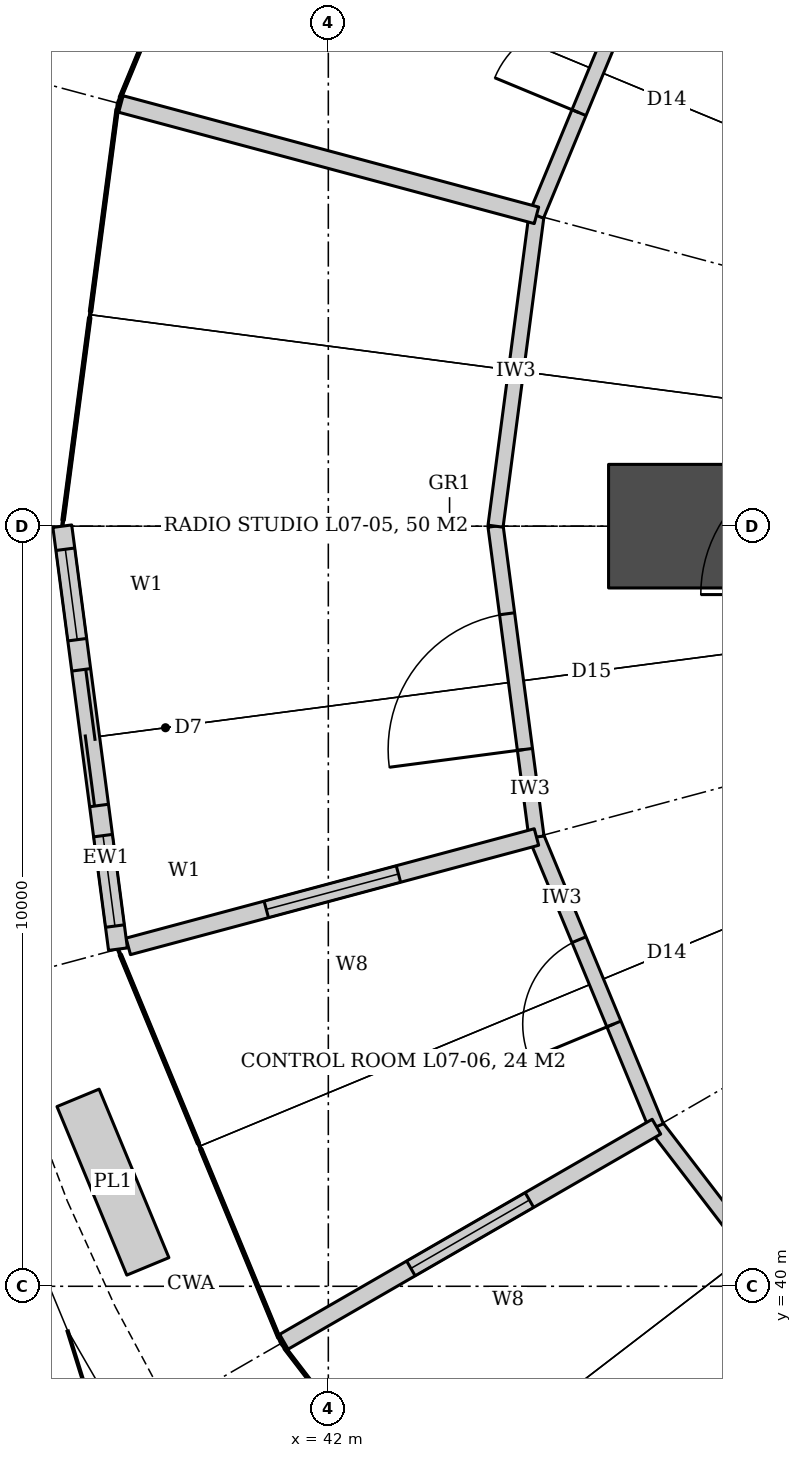
"""IFC4 building model, lengths in metres.
Left out: names, types, materials, properties, quantities, classifications, styles, units other than length and angle.
Written with IfcOpenShell. Run it as: python <this file> out.ifc"""

import sys

from ifc_helpers import new_model, si_unit, direction, frame, frame_2d, origin, origin_2d, place, context, subcontext, project, spatial, rectangle, hollow_circle, extrude, element, fill, save


model = new_model("IFC4")
c1 = context("Model", 3, precision=1e-05, world=origin(), true_north=direction((0.0, 1.0)))
c2 = subcontext(c1, "Body", "Model", "MODEL_VIEW")
j1 = project(units=[si_unit("LENGTHUNIT", "METRE"), si_unit("PLANEANGLEUNIT", "RADIAN")], contexts=[c1])
p1 = place(None, origin())
s1 = spatial("IfcSite", under=j1, at=p1, CompositionType="ELEMENT")
p2 = place(p1, origin())
s2 = spatial("IfcBuilding", under=s1, at=p2, CompositionType="ELEMENT")
p3 = place(p2, frame((0.0, 0.0, 30.2)))
s3 = spatial("IfcBuildingStorey", under=s2, at=p3, CompositionType="ELEMENT", Elevation=30.2)
p4 = place(p3, frame((46.5, 50.0, 0.0), z_axis=(0.0, 0.0, 1.0), x_axis=(1.0, 0.0, 0.0)))
e1 = element("IfcColumn", 1, at=p4, inside=s3, PredefinedType="COLUMN", context=c2, shape_type="SweptSolid", body=[
    extrude(hollow_circle(Radius=0.813, WallThickness=0.08, at=origin_2d()), origin(), (0.0, 0.0, 1.0), 4.2),
])
p5 = place(p3, frame((48.828, 38.828, 0.0), z_axis=(0.0, 0.0, 1.0), x_axis=(-0.608714823874, 0.793389099494, 0.0)))
e2 = element("IfcWall", 2, at=p5, inside=s3, PredefinedType="PARTITIONING", context=c2, shape_type="SweptSolid", body=[
    extrude(rectangle(XDim=4.125, YDim=0.2, at=frame_2d((2.062, 0.0))), origin(), (0.0, 0.0, 1.0), 3.04),
])
p6 = place(p3, frame((46.317, 42.1, 0.0), z_axis=(0.0, 0.0, 1.0), x_axis=(-0.382731667114, 0.923859551549, 0.0)))
e3 = element("IfcWall", 3, at=p6, inside=s3, PredefinedType="PARTITIONING", context=c2, shape_type="SweptSolid", body=[
    extrude(rectangle(XDim=4.125, YDim=0.2, at=frame_2d((2.062, 0.0))), origin(), (0.0, 0.0, 1.0), 3.04),
])
p7 = place(p6, frame((1.462, 0.0, 0.0)))
e4 = element("IfcOpeningElement", 4, at=p7, cuts=e3, PredefinedType="OPENING", context=c2, shape_type="SweptSolid", body=[
    extrude(rectangle(XDim=1.2, YDim=2.4, at=frame_2d((0.6, 1.2))), frame((0.0, 0.11, 0.0), z_axis=(0.0, -1.0, 0.0), x_axis=(1.0, 0.0, 0.0)), (0.0, 0.0, 1.0), 0.22),
])
p8 = place(p3, frame((44.738, 45.911, 0.0), z_axis=(0.0, 0.0, 1.0), x_axis=(-0.130515758099, 0.991446234996, 0.0)))
e5 = element("IfcWall", 5, at=p8, inside=s3, PredefinedType="PARTITIONING", context=c2, shape_type="SweptSolid", body=[
    extrude(rectangle(XDim=4.125, YDim=0.2, at=frame_2d((2.062, 0.0))), origin(), (0.0, 0.0, 1.0), 3.04),
])
p9 = place(p8, frame((1.162, 0.0, 0.0)))
e6 = element("IfcOpeningElement", 6, at=p9, cuts=e5, PredefinedType="OPENING", context=c2, shape_type="SweptSolid", body=[
    extrude(rectangle(XDim=1.8, YDim=2.7, at=frame_2d((0.9, 1.35))), frame((0.0, 0.11, 0.0), z_axis=(0.0, -1.0, 0.0), x_axis=(1.0, 0.0, 0.0)), (0.0, 0.0, 1.0), 0.22),
])
p10 = place(p3, frame((44.2, 50.0, 0.0), z_axis=(0.0, 0.0, 1.0), x_axis=(0.130515758099, 0.991446234996, 0.0)))
e7 = element("IfcWall", 7, at=p10, inside=s3, PredefinedType="PARTITIONING", context=c2, shape_type="SweptSolid", body=[
    extrude(rectangle(XDim=4.125, YDim=0.2, at=frame_2d((2.062, 0.0))), origin(), (0.0, 0.0, 1.0), 3.04),
])
p11 = place(p3, frame((44.738, 54.089, 0.0), z_axis=(0.0, 0.0, 1.0), x_axis=(0.382731667114, 0.923859551549, 0.0)))
e8 = element("IfcWall", 8, at=p11, inside=s3, PredefinedType="PARTITIONING", context=c2, shape_type="SweptSolid", body=[
    extrude(rectangle(XDim=4.125, YDim=0.2, at=frame_2d((2.062, 0.0))), origin(), (0.0, 0.0, 1.0), 3.04),
])
p12 = place(p11, frame((1.462, 0.0, 0.0)))
e9 = element("IfcOpeningElement", 9, at=p12, cuts=e8, PredefinedType="OPENING", context=c2, shape_type="SweptSolid", body=[
    extrude(rectangle(XDim=1.2, YDim=2.4, at=frame_2d((0.6, 1.2))), frame((0.0, 0.11, 0.0), z_axis=(0.0, -1.0, 0.0), x_axis=(1.0, 0.0, 0.0)), (0.0, 0.0, 1.0), 0.22),
])
p13 = place(p3, frame((44.738, 54.089, 0.0), z_axis=(0.0, 0.0, 1.0), x_axis=(-0.965926729572, 0.258815673981, 0.0)))
e10 = element("IfcWall", 10, at=p13, inside=s3, PredefinedType="PARTITIONING", context=c2, shape_type="SweptSolid", body=[
    extrude(rectangle(XDim=5.06, YDim=0.225, at=frame_2d((2.53, 0.0))), origin(), (0.0, 0.0, 1.0), 3.04),
])
p14 = place(p3, frame((44.738, 45.911, 0.0), z_axis=(0.0, 0.0, 1.0), x_axis=(-0.965925420227, -0.258820560544, 0.0)))
e11 = element("IfcWall", 11, at=p14, inside=s3, PredefinedType="PARTITIONING", context=c2, shape_type="SweptSolid", body=[
    extrude(rectangle(XDim=4.96, YDim=0.225, at=frame_2d((2.48, 0.0))), origin(), (0.0, 0.0, 1.0), 3.04),
])
p15 = place(p14, frame((1.58, 0.0, 0.9)))
e12 = element("IfcOpeningElement", 12, at=p15, cuts=e11, PredefinedType="OPENING", context=c2, shape_type="SweptSolid", body=[
    extrude(rectangle(XDim=1.8, YDim=1.2, at=frame_2d((0.9, 0.6))), frame((0.0, 0.123, 0.0), z_axis=(0.0, -1.0, 0.0), x_axis=(1.0, 0.0, 0.0)), (0.0, 0.0, 1.0), 0.245),
])
p16 = place(p3, frame((46.317, 42.1, 0.0), z_axis=(0.0, 0.0, 1.0), x_axis=(-0.866022478443, -0.500005066806, 0.0)))
e13 = element("IfcWall", 13, at=p16, inside=s3, PredefinedType="PARTITIONING", context=c2, shape_type="SweptSolid", body=[
    extrude(rectangle(XDim=5.06, YDim=0.225, at=frame_2d((2.53, 0.0))), origin(), (0.0, 0.0, 1.0), 3.04),
])
p17 = place(p16, frame((1.63, 0.0, 0.9)))
e14 = element("IfcOpeningElement", 14, at=p17, cuts=e13, PredefinedType="OPENING", context=c2, shape_type="SweptSolid", body=[
    extrude(rectangle(XDim=1.8, YDim=1.2, at=frame_2d((0.9, 0.6))), frame((0.0, 0.123, 0.0), z_axis=(0.0, -1.0, 0.0), x_axis=(1.0, 0.0, 0.0)), (0.0, 0.0, 1.0), 0.245),
])
p18 = place(p3, frame((39.1, 50.0, 0.0), z_axis=(0.0, 0.0, 1.0), x_axis=(0.130525119492, -0.991445002601, 0.0)))
e15 = element("IfcWall", 15, at=p18, inside=s3, PredefinedType="SOLIDWALL", context=c2, shape_type="SweptSolid", body=[
    extrude(rectangle(XDim=5.456, YDim=0.25, at=frame_2d((2.728, 0.0))), origin(), (0.0, 0.0, 1.0), 4.04),
])
p19 = place(p18, frame((1.828, 0.0, 0.0)))
e16 = element("IfcOpeningElement", 16, at=p19, cuts=e15, PredefinedType="OPENING", context=c2, shape_type="SweptSolid", body=[
    extrude(rectangle(XDim=1.8, YDim=2.4, at=frame_2d((0.9, 1.2))), frame((0.0, 0.135, 0.0), z_axis=(0.0, -1.0, 0.0), x_axis=(1.0, 0.0, 0.0)), (0.0, 0.0, 1.0), 0.27),
])
p20 = place(p18, frame((0.228, 0.0, 0.0)))
e17 = element("IfcOpeningElement", 17, at=p20, cuts=e15, PredefinedType="OPENING", context=c2, shape_type="SweptSolid", body=[
    extrude(rectangle(XDim=1.2, YDim=2.4, at=frame_2d((0.6, 1.2))), frame((0.0, 0.135, 0.0), z_axis=(0.0, -1.0, 0.0), x_axis=(1.0, 0.0, 0.0)), (0.0, 0.0, 1.0), 0.27),
])
p21 = place(p18, frame((4.028, 0.0, 0.0)))
e18 = element("IfcOpeningElement", 18, at=p21, cuts=e15, PredefinedType="OPENING", context=c2, shape_type="SweptSolid", body=[
    extrude(rectangle(XDim=1.2, YDim=2.4, at=frame_2d((0.6, 1.2))), frame((0.0, 0.135, 0.0), z_axis=(0.0, -1.0, 0.0), x_axis=(1.0, 0.0, 0.0)), (0.0, 0.0, 1.0), 0.27),
])
p22 = place(p15, origin())
e19 = element("IfcWindow", 19, at=p22, inside=s3, PartitioningType="SINGLE_PANEL", PredefinedType="WINDOW", context=c2, shape_type="SweptSolid", body=[
    extrude(rectangle(XDim=1.8, YDim=1.2, at=frame_2d((0.9, 0.6))), frame((0.0, 0.03, 0.0), z_axis=(0.0, -1.0, 0.0), x_axis=(1.0, 0.0, 0.0)), (0.0, 0.0, 1.0), 0.06),
])
fill(e12, e19)
p23 = place(p17, origin())
e20 = element("IfcWindow", 20, at=p23, inside=s3, PartitioningType="SINGLE_PANEL", PredefinedType="WINDOW", context=c2, shape_type="SweptSolid", body=[
    extrude(rectangle(XDim=1.8, YDim=1.2, at=frame_2d((0.9, 0.6))), frame((0.0, 0.03, 0.0), z_axis=(0.0, -1.0, 0.0), x_axis=(1.0, 0.0, 0.0)), (0.0, 0.0, 1.0), 0.06),
])
fill(e14, e20)
p24 = place(p12, origin())
e21 = element("IfcDoor", 21, at=p24, inside=s3, OperationType="SINGLE_SWING_LEFT", PredefinedType="DOOR", context=c2, shape_type="SweptSolid", body=[
    extrude(rectangle(XDim=1.2, YDim=2.4, at=frame_2d((0.6, 1.2))), frame((0.0, 0.025, 0.0), z_axis=(0.0, -1.0, 0.0), x_axis=(1.0, 0.0, 0.0)), (0.0, 0.0, 1.0), 0.05),
])
fill(e9, e21)
p25 = place(p9, origin())
e22 = element("IfcDoor", 22, at=p25, inside=s3, OperationType="DOUBLE_DOOR_DOUBLE_SWING", PredefinedType="DOOR", context=c2, shape_type="SweptSolid", body=[
    extrude(rectangle(XDim=1.8, YDim=2.7, at=frame_2d((0.9, 1.35))), frame((0.0, 0.025, 0.0), z_axis=(0.0, -1.0, 0.0), x_axis=(1.0, 0.0, 0.0)), (0.0, 0.0, 1.0), 0.05),
])
fill(e6, e22)
p26 = place(p7, origin())
e23 = element("IfcDoor", 23, at=p26, inside=s3, OperationType="SINGLE_SWING_LEFT", PredefinedType="DOOR", context=c2, shape_type="SweptSolid", body=[
    extrude(rectangle(XDim=1.2, YDim=2.4, at=frame_2d((0.6, 1.2))), frame((0.0, 0.025, 0.0), z_axis=(0.0, -1.0, 0.0), x_axis=(1.0, 0.0, 0.0)), (0.0, 0.0, 1.0), 0.05),
])
fill(e4, e23)
p27 = place(p19, origin())
e24 = element("IfcDoor", 24, at=p27, inside=s3, OperationType="DOUBLE_DOOR_SLIDING", PredefinedType="DOOR", context=c2, shape_type="SweptSolid", body=[
    extrude(rectangle(XDim=1.8, YDim=2.4, at=frame_2d((0.9, 1.2))), frame((0.0, 0.025, 0.0), z_axis=(0.0, -1.0, 0.0), x_axis=(1.0, 0.0, 0.0)), (0.0, 0.0, 1.0), 0.05),
])
fill(e16, e24)
p28 = place(p20, origin())
e25 = element("IfcWindow", 25, at=p28, inside=s3, PartitioningType="SINGLE_PANEL", PredefinedType="WINDOW", context=c2, shape_type="SweptSolid", body=[
    extrude(rectangle(XDim=1.2, YDim=2.4, at=frame_2d((0.6, 1.2))), frame((0.0, 0.03, 0.0), z_axis=(0.0, -1.0, 0.0), x_axis=(1.0, 0.0, 0.0)), (0.0, 0.0, 1.0), 0.06),
])
fill(e17, e25)
p29 = place(p21, origin())
e26 = element("IfcWindow", 26, at=p29, inside=s3, PartitioningType="SINGLE_PANEL", PredefinedType="WINDOW", context=c2, shape_type="SweptSolid", body=[
    extrude(rectangle(XDim=1.2, YDim=2.4, at=frame_2d((0.6, 1.2))), frame((0.0, 0.03, 0.0), z_axis=(0.0, -1.0, 0.0), x_axis=(1.0, 0.0, 0.0)), (0.0, 0.0, 1.0), 0.06),
])
fill(e18, e26)
save(model, sys.argv[1])
